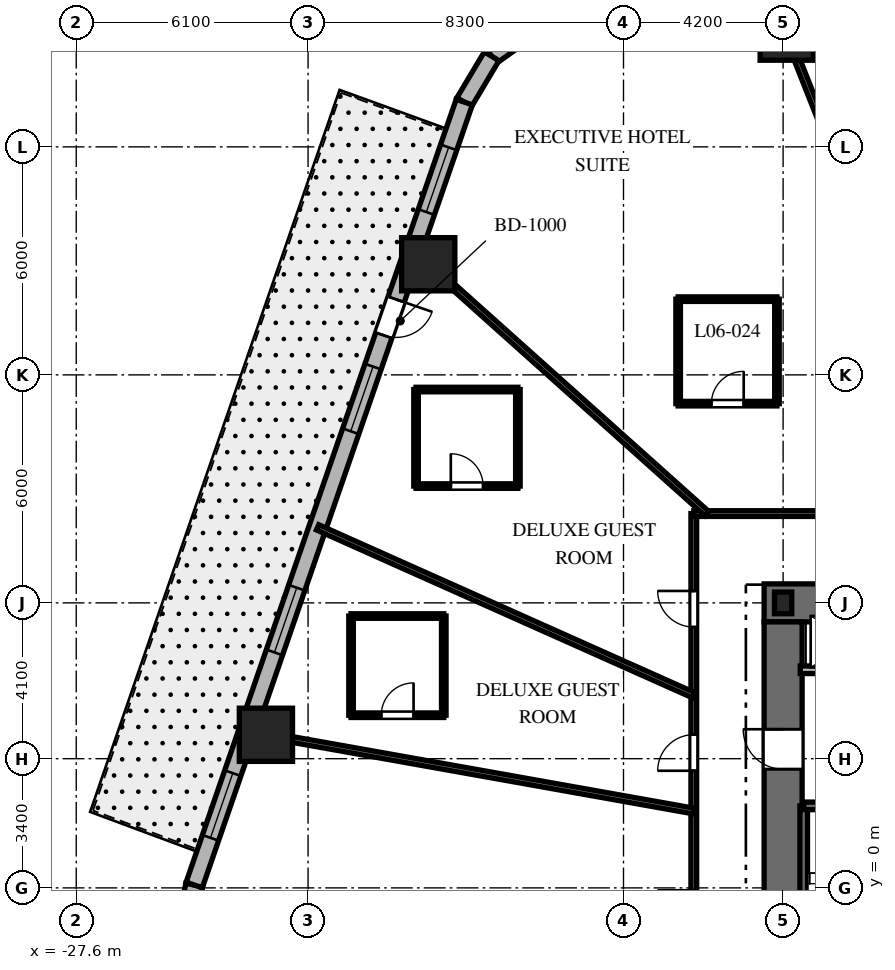
"""IFC4 building model, lengths in metres.
Left out: names, types, materials, properties, quantities, classifications, styles, units other than length and angle.
Written with IfcOpenShell. Run it as: python <this file> out.ifc"""

import sys

from ifc_helpers import new_model, si_unit, direction, frame, frame_2d, origin, origin_2d, place, context, subcontext, project, spatial, rectangle, i_section, extrude, element, fill, save


model = new_model("IFC4")
c1 = context("Model", 3, precision=1e-05, world=origin(), true_north=direction((0.0, 1.0)))
c2 = subcontext(c1, "Body", "Model", "MODEL_VIEW")
j1 = project(units=[si_unit("LENGTHUNIT", "METRE"), si_unit("PLANEANGLEUNIT", "RADIAN")], contexts=[c1])
p1 = place(None, origin())
s1 = spatial("IfcSite", under=j1, at=p1, CompositionType="ELEMENT")
p2 = place(p1, origin())
s2 = spatial("IfcBuilding", under=s1, at=p2, CompositionType="ELEMENT")
p3 = place(p2, frame((0.0, 0.0, 34.2)))
s3 = spatial("IfcBuildingStorey", under=s2, at=p3, CompositionType="ELEMENT", Elevation=34.2)
p4 = place(p3, frame((-9.5, 7.5, 0.0), z_axis=(0.0, 0.0, 1.0), x_axis=(1.0, 0.0, 0.0)))
e1 = element("IfcWall", 1, at=p4, inside=s3, PredefinedType="SHEAR", context=c2, shape_type="SweptSolid", body=[
    extrude(rectangle(XDim=9.55, YDim=1.0, at=frame_2d((4.775, 0.0))), origin(), (0.0, 0.0, 1.0), 3.7),
])
p5 = place(p3, frame((-9.0, -7.0, 0.0), z_axis=(0.0, 0.0, 1.0), x_axis=(0.0, 1.0, 0.0)))
e2 = element("IfcWall", 2, at=p5, inside=s3, PredefinedType="SHEAR", context=c2, shape_type="SweptSolid", body=[
    extrude(rectangle(XDim=14.0, YDim=1.0, at=frame_2d((7.0, 0.0))), origin(), (0.0, 0.0, 1.0), 3.7),
])
p6 = place(p5, frame((10.125, 0.0, 0.0)))
e3 = element("IfcOpeningElement", 3, at=p6, cuts=e2, PredefinedType="OPENING", context=c2, shape_type="SweptSolid", body=[
    extrude(rectangle(XDim=1.05, YDim=2.15, at=frame_2d((0.525, 1.075))), frame((0.0, 0.51, 0.0), z_axis=(0.0, -1.0, 0.0), x_axis=(1.0, 0.0, 0.0)), (0.0, 0.0, 1.0), 1.02),
])
p7 = place(p3, frame((-8.458, -6.985, 0.0), z_axis=(0.0, 0.0, 1.0), x_axis=(0.0, 1.0, 0.0)))
e4 = element("IfcWall", 4, at=p7, inside=s3, PredefinedType="SHEAR", context=c2, shape_type="SweptSolid", body=[
    extrude(rectangle(XDim=9.143, YDim=0.2, at=frame_2d((4.572, 0.0))), origin(), (0.0, 0.0, 1.0), 3.7),
])
p8 = place(p3, frame((-8.458, 2.158, 0.0), z_axis=(0.0, 0.0, 1.0), x_axis=(1.0, 0.0, 0.0)))
e5 = element("IfcWall", 5, at=p8, inside=s3, PredefinedType="SHEAR", context=c2, shape_type="SweptSolid", body=[
    extrude(rectangle(XDim=3.686, YDim=0.2, at=frame_2d((1.843, 0.0))), origin(), (0.0, 0.0, 1.0), 3.7),
])
p9 = place(p8, frame((1.3, 0.0, 0.0)))
e6 = element("IfcOpeningElement", 6, at=p9, cuts=e5, PredefinedType="OPENING", context=c2, shape_type="SweptSolid", body=[
    extrude(rectangle(XDim=1.0, YDim=2.15, at=frame_2d((0.5, 1.075))), frame((0.0, 0.11, 0.0), z_axis=(0.0, -1.0, 0.0), x_axis=(1.0, 0.0, 0.0)), (0.0, 0.0, 1.0), 0.22),
])
p10 = place(p3, frame((-9.0, 7.5, 0.0), z_axis=(0.0, 0.0, 1.0), x_axis=(1.0, 0.0, 0.0)))
e7 = element("IfcColumn", 7, at=p10, inside=s3, PredefinedType="COLUMN", context=c2, shape_type="SweptSolid", body=[
    extrude(i_section(OverallWidth=0.454, OverallDepth=0.569, WebThickness=0.078, FlangeThickness=0.125, at=origin_2d()), origin(), (0.0, 0.0, 1.0), 3.7),
])
for number, where, z_axis, x_axis in (
    (8, (-8.905, 22.48, 0.0), (0.0, 0.0, 1.0), (1.0, 0.0, 0.0)),
    (9, (-18.338, 16.411, 0.0), (0.0, 0.0, 1.0), (1.0, 0.0, 0.0)),
    (10, (-22.609, 4.029, 0.0), (0.0, 0.0, 1.0), (1.0, 0.0, 0.0)),
):
    element("IfcColumn", number, at=place(p3, frame(where, z_axis=z_axis, x_axis=x_axis)), inside=s3, PredefinedType="COLUMN", context=c2, shape_type="SweptSolid", body=[
        extrude(rectangle(XDim=1.4, YDim=1.4, at=origin_2d()), origin(), (0.0, 0.0, 1.0), 3.7),
    ])
p11 = place(p3, frame((-15.544, 22.687, 0.0), z_axis=(0.0, 0.0, 1.0), x_axis=(-0.814210854316, -0.580569276412, 0.0)))
e11 = element("IfcWall", 11, at=p11, inside=s3, PredefinedType="SOLIDWALL", context=c2, shape_type="SweptSolid", body=[
    extrude(rectangle(XDim=1.381, YDim=0.45, at=frame_2d((0.691, 0.0))), origin(), (0.0, 0.0, 1.0), 3.4),
])
p12 = place(p3, frame((-16.669, 21.885, 0.0), z_axis=(0.0, 0.0, 1.0), x_axis=(-0.512936712947, -0.858426425799, 0.0)))
e12 = element("IfcWall", 12, at=p12, inside=s3, PredefinedType="SOLIDWALL", context=c2, shape_type="SweptSolid", body=[
    extrude(rectangle(XDim=1.406, YDim=0.45, at=frame_2d((0.703, 0.0))), origin(), (0.0, 0.0, 1.0), 3.4),
])
p13 = place(p3, frame((-24.496, 0.077, 0.0), z_axis=(0.0, 0.0, 1.0), x_axis=(-0.199570594521, -0.979883451132, 0.0)))
e13 = element("IfcWall", 13, at=p13, inside=s3, PredefinedType="SOLIDWALL", context=c2, shape_type="SweptSolid", body=[
    extrude(rectangle(XDim=0.897, YDim=0.45, at=frame_2d((0.448, 0.0))), origin(), (0.0, 0.0, 1.0), 3.4),
])
p14 = place(p3, frame((-17.39, 20.678, 0.0), z_axis=(0.0, 0.0, 1.0), x_axis=(-0.326068018294, -0.945346310854, 0.0)))
e14 = element("IfcWall", 14, at=p14, inside=s3, PredefinedType="SOLIDWALL", context=c2, shape_type="SweptSolid", body=[
    extrude(rectangle(XDim=21.793, YDim=0.45, at=frame_2d((10.896, 0.0))), origin(), (0.0, 0.0, 1.0), 3.4),
])
p15 = place(p14, frame((5.493, 0.0, 0.0)))
e15 = element("IfcOpeningElement", 15, at=p15, cuts=e14, PredefinedType="OPENING", context=c2, shape_type="SweptSolid", body=[
    extrude(rectangle(XDim=1.0, YDim=2.15, at=frame_2d((0.5, 1.075))), frame((0.0, 0.235, 0.0), z_axis=(0.0, -1.0, 0.0), x_axis=(1.0, 0.0, 0.0)), (0.0, 0.0, 1.0), 0.47),
])
p16 = place(p14, frame((1.26, 0.0, 0.8)))
e16 = element("IfcOpeningElement", 16, at=p16, cuts=e14, PredefinedType="OPENING", context=c2, shape_type="SweptSolid", body=[
    extrude(rectangle(XDim=1.8, YDim=1.8, at=frame_2d((0.9, 0.9))), frame((0.0, 0.235, 0.0), z_axis=(0.0, -1.0, 0.0), x_axis=(1.0, 0.0, 0.0)), (0.0, 0.0, 1.0), 0.47),
])
p17 = place(p14, frame((7.363, 0.0, 0.8)))
e17 = element("IfcOpeningElement", 17, at=p17, cuts=e14, PredefinedType="OPENING", context=c2, shape_type="SweptSolid", body=[
    extrude(rectangle(XDim=1.8, YDim=1.8, at=frame_2d((0.9, 0.9))), frame((0.0, 0.235, 0.0), z_axis=(0.0, -1.0, 0.0), x_axis=(1.0, 0.0, 0.0)), (0.0, 0.0, 1.0), 0.47),
])
p18 = place(p14, frame((13.518, 0.0, 0.8)))
e18 = element("IfcOpeningElement", 18, at=p18, cuts=e14, PredefinedType="OPENING", context=c2, shape_type="SweptSolid", body=[
    extrude(rectangle(XDim=1.8, YDim=1.8, at=frame_2d((0.9, 0.9))), frame((0.0, 0.235, 0.0), z_axis=(0.0, -1.0, 0.0), x_axis=(1.0, 0.0, 0.0)), (0.0, 0.0, 1.0), 0.47),
])
p19 = place(p14, frame((18.68, 0.0, 0.8)))
e19 = element("IfcOpeningElement", 19, at=p19, cuts=e14, PredefinedType="OPENING", context=c2, shape_type="SweptSolid", body=[
    extrude(rectangle(XDim=1.8, YDim=1.8, at=frame_2d((0.9, 0.9))), frame((0.0, 0.235, 0.0), z_axis=(0.0, -1.0, 0.0), x_axis=(1.0, 0.0, 0.0)), (0.0, 0.0, 1.0), 0.47),
])
p20 = place(p3, frame((-8.55, 5.74, 0.0), z_axis=(0.0, 0.0, 1.0), x_axis=(1.0, 0.0, 0.0)))
e20 = element("IfcWall", 20, at=p20, inside=s3, PredefinedType="PARTITIONING", context=c2, shape_type="SweptSolid", body=[
    extrude(rectangle(XDim=4.05, YDim=0.2, at=frame_2d((2.025, 0.0))), origin(), (0.0, 0.0, 1.0), 3.4),
])
p21 = place(p20, frame((0.75, 0.0, 0.0)))
e21 = element("IfcOpeningElement", 21, at=p21, cuts=e20, PredefinedType="OPENING", context=c2, shape_type="SweptSolid", body=[
    extrude(rectangle(XDim=1.1, YDim=2.2, at=frame_2d((0.55, 1.1))), frame((0.0, 0.11, 0.0), z_axis=(0.0, -1.0, 0.0), x_axis=(1.0, 0.0, 0.0)), (0.0, 0.0, 1.0), 0.22),
])
p22 = place(p20, frame((2.9, 0.0, 0.0)))
e22 = element("IfcOpeningElement", 22, at=p22, cuts=e20, PredefinedType="OPENING", context=c2, shape_type="SweptSolid", body=[
    extrude(rectangle(XDim=0.85, YDim=2.03, at=frame_2d((0.425, 1.015))), frame((0.0, 0.11, 0.0), z_axis=(0.0, -1.0, 0.0), x_axis=(1.0, 0.0, 0.0)), (0.0, 0.0, 1.0), 0.22),
])
p23 = place(p3, frame((-11.35, -9.85, 0.0), z_axis=(0.0, 0.0, 1.0), x_axis=(0.0, 1.0, 0.0)))
e23 = element("IfcWall", 23, at=p23, inside=s3, PredefinedType="PARTITIONING", context=c2, shape_type="SweptSolid", body=[
    extrude(rectangle(XDim=19.7, YDim=0.15, at=frame_2d((9.85, 0.0))), origin(), (0.0, 0.0, 1.0), 2.84),
])
p24 = place(p23, frame((16.714, 0.0, 0.0)))
e24 = element("IfcOpeningElement", 24, at=p24, cuts=e23, PredefinedType="OPENING", context=c2, shape_type="SweptSolid", body=[
    extrude(rectangle(XDim=0.95, YDim=2.03, at=frame_2d((0.475, 1.015))), frame((0.0, 0.085, 0.0), z_axis=(0.0, -1.0, 0.0), x_axis=(1.0, 0.0, 0.0)), (0.0, 0.0, 1.0), 0.17),
])
p25 = place(p23, frame((12.932, 0.0, 0.0)))
e25 = element("IfcOpeningElement", 25, at=p25, cuts=e23, PredefinedType="OPENING", context=c2, shape_type="SweptSolid", body=[
    extrude(rectangle(XDim=0.95, YDim=2.03, at=frame_2d((0.475, 1.015))), frame((0.0, 0.085, 0.0), z_axis=(0.0, -1.0, 0.0), x_axis=(1.0, 0.0, 0.0)), (0.0, 0.0, 1.0), 0.17),
])
p26 = place(p23, frame((8.838, 0.0, 0.0)))
e26 = element("IfcOpeningElement", 26, at=p26, cuts=e23, PredefinedType="OPENING", context=c2, shape_type="SweptSolid", body=[
    extrude(rectangle(XDim=0.95, YDim=2.03, at=frame_2d((0.475, 1.015))), frame((0.0, 0.085, 0.0), z_axis=(0.0, -1.0, 0.0), x_axis=(1.0, 0.0, 0.0)), (0.0, 0.0, 1.0), 0.17),
])
p27 = place(p23, frame((4.461, 0.0, 0.0)))
e27 = element("IfcOpeningElement", 27, at=p27, cuts=e23, PredefinedType="OPENING", context=c2, shape_type="SweptSolid", body=[
    extrude(rectangle(XDim=0.95, YDim=2.03, at=frame_2d((0.475, 1.015))), frame((0.0, 0.085, 0.0), z_axis=(0.0, -1.0, 0.0), x_axis=(1.0, 0.0, 0.0)), (0.0, 0.0, 1.0), 0.17),
])
p28 = place(p23, frame((1.221, 0.0, 0.0)))
e28 = element("IfcOpeningElement", 28, at=p28, cuts=e23, PredefinedType="OPENING", context=c2, shape_type="SweptSolid", body=[
    extrude(rectangle(XDim=0.95, YDim=2.03, at=frame_2d((0.475, 1.015))), frame((0.0, 0.085, 0.0), z_axis=(0.0, -1.0, 0.0), x_axis=(1.0, 0.0, 0.0)), (0.0, 0.0, 1.0), 0.17),
])
p29 = place(p3, frame((-11.35, 9.85, 0.0), z_axis=(0.0, 0.0, 1.0), x_axis=(1.0, 0.0, 0.0)))
e29 = element("IfcWall", 29, at=p29, inside=s3, PredefinedType="PARTITIONING", context=c2, shape_type="SweptSolid", body=[
    extrude(rectangle(XDim=22.7, YDim=0.15, at=frame_2d((11.35, 0.0))), origin(), (0.0, 0.0, 1.0), 2.84),
])
p30 = place(p29, frame((18.436, 0.0, 0.0)))
e30 = element("IfcOpeningElement", 30, at=p30, cuts=e29, PredefinedType="OPENING", context=c2, shape_type="SweptSolid", body=[
    extrude(rectangle(XDim=0.95, YDim=2.03, at=frame_2d((0.475, 1.015))), frame((0.0, 0.085, 0.0), z_axis=(0.0, -1.0, 0.0), x_axis=(1.0, 0.0, 0.0)), (0.0, 0.0, 1.0), 0.17),
])
p31 = place(p29, frame((15.176, 0.0, 0.0)))
e31 = element("IfcOpeningElement", 31, at=p31, cuts=e29, PredefinedType="OPENING", context=c2, shape_type="SweptSolid", body=[
    extrude(rectangle(XDim=0.9, YDim=2.03, at=frame_2d((0.45, 1.015))), frame((0.0, 0.085, 0.0), z_axis=(0.0, -1.0, 0.0), x_axis=(1.0, 0.0, 0.0)), (0.0, 0.0, 1.0), 0.17),
])
p32 = place(p29, frame((12.415, 0.0, 0.0)))
e32 = element("IfcOpeningElement", 32, at=p32, cuts=e29, PredefinedType="OPENING", context=c2, shape_type="SweptSolid", body=[
    extrude(rectangle(XDim=0.95, YDim=2.03, at=frame_2d((0.475, 1.015))), frame((0.0, 0.085, 0.0), z_axis=(0.0, -1.0, 0.0), x_axis=(1.0, 0.0, 0.0)), (0.0, 0.0, 1.0), 0.17),
])
p33 = place(p29, frame((8.925, 0.0, 0.0)))
e33 = element("IfcOpeningElement", 33, at=p33, cuts=e29, PredefinedType="OPENING", context=c2, shape_type="SweptSolid", body=[
    extrude(rectangle(XDim=0.95, YDim=2.03, at=frame_2d((0.475, 1.015))), frame((0.0, 0.085, 0.0), z_axis=(0.0, -1.0, 0.0), x_axis=(1.0, 0.0, 0.0)), (0.0, 0.0, 1.0), 0.17),
])
p34 = place(p29, frame((3.369, 0.0, 0.0)))
e34 = element("IfcOpeningElement", 34, at=p34, cuts=e29, PredefinedType="OPENING", context=c2, shape_type="SweptSolid", body=[
    extrude(rectangle(XDim=0.95, YDim=2.03, at=frame_2d((0.475, 1.015))), frame((0.0, 0.085, 0.0), z_axis=(0.0, -1.0, 0.0), x_axis=(1.0, 0.0, 0.0)), (0.0, 0.0, 1.0), 0.17),
])
p35 = place(p3, frame((-3.902, 9.85, 0.0), z_axis=(0.0, 0.0, 1.0), x_axis=(-0.36828765711, 0.929711891728, 0.0)))
e35 = element("IfcWall", 35, at=p35, inside=s3, PredefinedType="PARTITIONING", context=c2, shape_type="SweptSolid", body=[
    extrude(rectangle(XDim=14.117, YDim=0.15, at=frame_2d((7.059, 0.0))), origin(), (0.0, 0.0, 1.0), 2.54),
])
p36 = place(p3, frame((-11.007, 9.85, 0.0), z_axis=(0.0, 0.0, 1.0), x_axis=(-0.745177305978, 0.666866390407, 0.0)))
e36 = element("IfcWall", 36, at=p36, inside=s3, PredefinedType="PARTITIONING", context=c2, shape_type="SweptSolid", body=[
    extrude(rectangle(XDim=10.375, YDim=0.15, at=frame_2d((5.188, 0.0))), origin(), (0.0, 0.0, 1.0), 2.54),
])
p37 = place(p3, frame((-11.35, 5.068, 0.0), z_axis=(0.0, 0.0, 1.0), x_axis=(-0.913107192911, 0.407719577963, 0.0)))
e37 = element("IfcWall", 37, at=p37, inside=s3, PredefinedType="PARTITIONING", context=c2, shape_type="SweptSolid", body=[
    extrude(rectangle(XDim=10.841, YDim=0.15, at=frame_2d((5.421, 0.0))), origin(), (0.0, 0.0, 1.0), 2.54),
])
p38 = place(p3, frame((-11.35, 2.023, 0.0), z_axis=(0.0, 0.0, 1.0), x_axis=(-0.984493741877, 0.17541970301, 0.0)))
e38 = element("IfcWall", 38, at=p38, inside=s3, PredefinedType="PARTITIONING", context=c2, shape_type="SweptSolid", body=[
    extrude(rectangle(XDim=11.937, YDim=0.15, at=frame_2d((5.969, 0.0))), origin(), (0.0, 0.0, 1.0), 2.54),
])
p39 = place(p3, frame((-11.762, 12.743, 0.0), z_axis=(0.0, 0.0, 1.0), x_axis=(1.0, 0.0, 0.0)))
e39 = element("IfcWall", 39, at=p39, inside=s3, PredefinedType="PARTITIONING", context=c2, shape_type="SweptSolid", body=[
    extrude(rectangle(XDim=2.6, YDim=0.12, at=frame_2d((1.3, 0.0))), origin(), (0.0, 0.0, 1.0), 2.972),
])
p40 = place(p39, frame((0.875, 0.0, 0.0)))
e40 = element("IfcOpeningElement", 40, at=p40, cuts=e39, PredefinedType="OPENING", context=c2, shape_type="SweptSolid", body=[
    extrude(rectangle(XDim=0.85, YDim=2.03, at=frame_2d((0.425, 1.015))), frame((0.0, 0.07, 0.0), z_axis=(0.0, -1.0, 0.0), x_axis=(1.0, 0.0, 0.0)), (0.0, 0.0, 1.0), 0.14),
])
p41 = place(p3, frame((-9.162, 12.743, 0.0), z_axis=(0.0, 0.0, 1.0), x_axis=(0.0, 1.0, 0.0)))
e41 = element("IfcWall", 41, at=p41, inside=s3, PredefinedType="PARTITIONING", context=c2, shape_type="SweptSolid", body=[
    extrude(rectangle(XDim=2.75, YDim=0.12, at=frame_2d((1.375, 0.0))), origin(), (0.0, 0.0, 1.0), 2.84),
])
p42 = place(p3, frame((-9.162, 15.493, 0.0), z_axis=(0.0, 0.0, 1.0), x_axis=(-1.0, 0.0, 0.0)))
e42 = element("IfcWall", 42, at=p42, inside=s3, PredefinedType="PARTITIONING", context=c2, shape_type="SweptSolid", body=[
    extrude(rectangle(XDim=2.6, YDim=0.12, at=frame_2d((1.3, 0.0))), origin(), (0.0, 0.0, 1.0), 3.4),
])
p43 = place(p3, frame((-11.762, 15.493, 0.0), z_axis=(0.0, 0.0, 1.0), x_axis=(0.0, -1.0, 0.0)))
e43 = element("IfcWall", 43, at=p43, inside=s3, PredefinedType="PARTITIONING", context=c2, shape_type="SweptSolid", body=[
    extrude(rectangle(XDim=2.75, YDim=0.12, at=frame_2d((1.375, 0.0))), origin(), (0.0, 0.0, 1.0), 3.4),
])
p44 = place(p3, frame((-18.659, 10.574, 0.0), z_axis=(0.0, 0.0, 1.0), x_axis=(1.0, 0.0, 0.0)))
e44 = element("IfcWall", 44, at=p44, inside=s3, PredefinedType="PARTITIONING", context=c2, shape_type="SweptSolid", body=[
    extrude(rectangle(XDim=2.68, YDim=0.12, at=frame_2d((1.34, 0.0))), origin(), (0.0, 0.0, 1.0), 2.972),
])
p45 = place(p44, frame((0.915, 0.0, 0.0)))
e45 = element("IfcOpeningElement", 45, at=p45, cuts=e44, PredefinedType="OPENING", context=c2, shape_type="SweptSolid", body=[
    extrude(rectangle(XDim=0.85, YDim=2.03, at=frame_2d((0.425, 1.015))), frame((0.0, 0.07, 0.0), z_axis=(0.0, -1.0, 0.0), x_axis=(1.0, 0.0, 0.0)), (0.0, 0.0, 1.0), 0.14),
])
p46 = place(p3, frame((-15.979, 10.574, 0.0), z_axis=(0.0, 0.0, 1.0), x_axis=(0.0, 1.0, 0.0)))
e46 = element("IfcWall", 46, at=p46, inside=s3, PredefinedType="PARTITIONING", context=c2, shape_type="SweptSolid", body=[
    extrude(rectangle(XDim=2.54, YDim=0.12, at=frame_2d((1.27, 0.0))), origin(), (0.0, 0.0, 1.0), 2.972),
])
p47 = place(p3, frame((-15.979, 13.114, 0.0), z_axis=(0.0, 0.0, 1.0), x_axis=(-1.0, 0.0, 0.0)))
e47 = element("IfcWall", 47, at=p47, inside=s3, PredefinedType="PARTITIONING", context=c2, shape_type="SweptSolid", body=[
    extrude(rectangle(XDim=2.68, YDim=0.12, at=frame_2d((1.34, 0.0))), origin(), (0.0, 0.0, 1.0), 3.4),
])
p48 = place(p3, frame((-18.659, 13.114, 0.0), z_axis=(0.0, 0.0, 1.0), x_axis=(0.0, -1.0, 0.0)))
e48 = element("IfcWall", 48, at=p48, inside=s3, PredefinedType="PARTITIONING", context=c2, shape_type="SweptSolid", body=[
    extrude(rectangle(XDim=2.54, YDim=0.12, at=frame_2d((1.27, 0.0))), origin(), (0.0, 0.0, 1.0), 3.4),
])
p49 = place(p3, frame((-20.369, 4.544, 0.0), z_axis=(0.0, 0.0, 1.0), x_axis=(1.0, 0.0, 0.0)))
e49 = element("IfcWall", 49, at=p49, inside=s3, PredefinedType="PARTITIONING", context=c2, shape_type="SweptSolid", body=[
    extrude(rectangle(XDim=2.44, YDim=0.12, at=frame_2d((1.22, 0.0))), origin(), (0.0, 0.0, 1.0), 2.84),
])
p50 = place(p49, frame((0.795, 0.0, 0.0)))
e50 = element("IfcOpeningElement", 50, at=p50, cuts=e49, PredefinedType="OPENING", context=c2, shape_type="SweptSolid", body=[
    extrude(rectangle(XDim=0.85, YDim=2.03, at=frame_2d((0.425, 1.015))), frame((0.0, 0.07, 0.0), z_axis=(0.0, -1.0, 0.0), x_axis=(1.0, 0.0, 0.0)), (0.0, 0.0, 1.0), 0.14),
])
p51 = place(p3, frame((-17.929, 4.544, 0.0), z_axis=(0.0, 0.0, 1.0), x_axis=(0.0, 1.0, 0.0)))
e51 = element("IfcWall", 51, at=p51, inside=s3, PredefinedType="PARTITIONING", context=c2, shape_type="SweptSolid", body=[
    extrude(rectangle(XDim=2.61, YDim=0.12, at=frame_2d((1.305, 0.0))), origin(), (0.0, 0.0, 1.0), 2.84),
])
p52 = place(p3, frame((-17.929, 7.154, 0.0), z_axis=(0.0, 0.0, 1.0), x_axis=(-1.0, 0.0, 0.0)))
e52 = element("IfcWall", 52, at=p52, inside=s3, PredefinedType="PARTITIONING", context=c2, shape_type="SweptSolid", body=[
    extrude(rectangle(XDim=2.44, YDim=0.12, at=frame_2d((1.22, 0.0))), origin(), (0.0, 0.0, 1.0), 3.4),
])
p53 = place(p3, frame((-20.369, 7.154, 0.0), z_axis=(0.0, 0.0, 1.0), x_axis=(0.0, -1.0, 0.0)))
e53 = element("IfcWall", 53, at=p53, inside=s3, PredefinedType="PARTITIONING", context=c2, shape_type="SweptSolid", body=[
    extrude(rectangle(XDim=2.61, YDim=0.12, at=frame_2d((1.305, 0.0))), origin(), (0.0, 0.0, 1.0), 2.84),
])
p54 = place(p15, origin())
e54 = element("IfcDoor", 54, at=p54, inside=s3, OperationType="SINGLE_SWING_LEFT", PredefinedType="DOOR", context=c2, shape_type="SweptSolid", body=[
    extrude(rectangle(XDim=1.0, YDim=2.15, at=frame_2d((0.5, 1.075))), frame((0.0, 0.025, 0.0), z_axis=(0.0, -1.0, 0.0), x_axis=(1.0, 0.0, 0.0)), (0.0, 0.0, 1.0), 0.05),
])
fill(e15, e54)
p55 = place(p16, origin())
e55 = element("IfcWindow", 55, at=p55, inside=s3, PartitioningType="SINGLE_PANEL", PredefinedType="WINDOW", context=c2, shape_type="SweptSolid", body=[
    extrude(rectangle(XDim=1.8, YDim=1.8, at=frame_2d((0.9, 0.9))), frame((0.0, 0.03, 0.0), z_axis=(0.0, -1.0, 0.0), x_axis=(1.0, 0.0, 0.0)), (0.0, 0.0, 1.0), 0.06),
])
fill(e16, e55)
p56 = place(p17, origin())
e56 = element("IfcWindow", 56, at=p56, inside=s3, PartitioningType="SINGLE_PANEL", PredefinedType="WINDOW", context=c2, shape_type="SweptSolid", body=[
    extrude(rectangle(XDim=1.8, YDim=1.8, at=frame_2d((0.9, 0.9))), frame((0.0, 0.03, 0.0), z_axis=(0.0, -1.0, 0.0), x_axis=(1.0, 0.0, 0.0)), (0.0, 0.0, 1.0), 0.06),
])
fill(e17, e56)
p57 = place(p18, origin())
e57 = element("IfcWindow", 57, at=p57, inside=s3, PartitioningType="SINGLE_PANEL", PredefinedType="WINDOW", context=c2, shape_type="SweptSolid", body=[
    extrude(rectangle(XDim=1.8, YDim=1.8, at=frame_2d((0.9, 0.9))), frame((0.0, 0.03, 0.0), z_axis=(0.0, -1.0, 0.0), x_axis=(1.0, 0.0, 0.0)), (0.0, 0.0, 1.0), 0.06),
])
fill(e18, e57)
p58 = place(p19, origin())
e58 = element("IfcWindow", 58, at=p58, inside=s3, PartitioningType="SINGLE_PANEL", PredefinedType="WINDOW", context=c2, shape_type="SweptSolid", body=[
    extrude(rectangle(XDim=1.8, YDim=1.8, at=frame_2d((0.9, 0.9))), frame((0.0, 0.03, 0.0), z_axis=(0.0, -1.0, 0.0), x_axis=(1.0, 0.0, 0.0)), (0.0, 0.0, 1.0), 0.06),
])
fill(e19, e58)
p59 = place(p6, origin())
e59 = element("IfcDoor", 59, at=p59, inside=s3, OperationType="SINGLE_SWING_RIGHT", PredefinedType="DOOR", context=c2, shape_type="SweptSolid", body=[
    extrude(rectangle(XDim=1.05, YDim=2.15, at=frame_2d((0.525, 1.075))), frame((0.0, 0.025, 0.0), z_axis=(0.0, -1.0, 0.0), x_axis=(1.0, 0.0, 0.0)), (0.0, 0.0, 1.0), 0.05),
])
fill(e3, e59)
p60 = place(p40, origin())
e60 = element("IfcDoor", 60, at=p60, inside=s3, OperationType="SINGLE_SWING_RIGHT", PredefinedType="DOOR", context=c2, shape_type="SweptSolid", body=[
    extrude(rectangle(XDim=0.85, YDim=2.03, at=frame_2d((0.425, 1.015))), frame((0.0, 0.025, 0.0), z_axis=(0.0, -1.0, 0.0), x_axis=(1.0, 0.0, 0.0)), (0.0, 0.0, 1.0), 0.05),
])
fill(e40, e60)
p61 = place(p24, origin())
e61 = element("IfcDoor", 61, at=p61, inside=s3, OperationType="SINGLE_SWING_RIGHT", PredefinedType="DOOR", context=c2, shape_type="SweptSolid", body=[
    extrude(rectangle(XDim=0.95, YDim=2.03, at=frame_2d((0.475, 1.015))), frame((0.0, 0.025, 0.0), z_axis=(0.0, -1.0, 0.0), x_axis=(1.0, 0.0, 0.0)), (0.0, 0.0, 1.0), 0.05),
])
fill(e24, e61)
p62 = place(p45, origin())
e62 = element("IfcDoor", 62, at=p62, inside=s3, OperationType="SINGLE_SWING_LEFT", PredefinedType="DOOR", context=c2, shape_type="SweptSolid", body=[
    extrude(rectangle(XDim=0.85, YDim=2.03, at=frame_2d((0.425, 1.015))), frame((0.0, 0.025, 0.0), z_axis=(0.0, -1.0, 0.0), x_axis=(1.0, 0.0, 0.0)), (0.0, 0.0, 1.0), 0.05),
])
fill(e45, e62)
p63 = place(p25, origin())
e63 = element("IfcDoor", 63, at=p63, inside=s3, OperationType="SINGLE_SWING_LEFT", PredefinedType="DOOR", context=c2, shape_type="SweptSolid", body=[
    extrude(rectangle(XDim=0.95, YDim=2.03, at=frame_2d((0.475, 1.015))), frame((0.0, 0.025, 0.0), z_axis=(0.0, -1.0, 0.0), x_axis=(1.0, 0.0, 0.0)), (0.0, 0.0, 1.0), 0.05),
])
fill(e25, e63)
p64 = place(p50, origin())
e64 = element("IfcDoor", 64, at=p64, inside=s3, OperationType="SINGLE_SWING_RIGHT", PredefinedType="DOOR", context=c2, shape_type="SweptSolid", body=[
    extrude(rectangle(XDim=0.85, YDim=2.03, at=frame_2d((0.425, 1.015))), frame((0.0, 0.025, 0.0), z_axis=(0.0, -1.0, 0.0), x_axis=(1.0, 0.0, 0.0)), (0.0, 0.0, 1.0), 0.05),
])
fill(e50, e64)
save(model, sys.argv[1])
